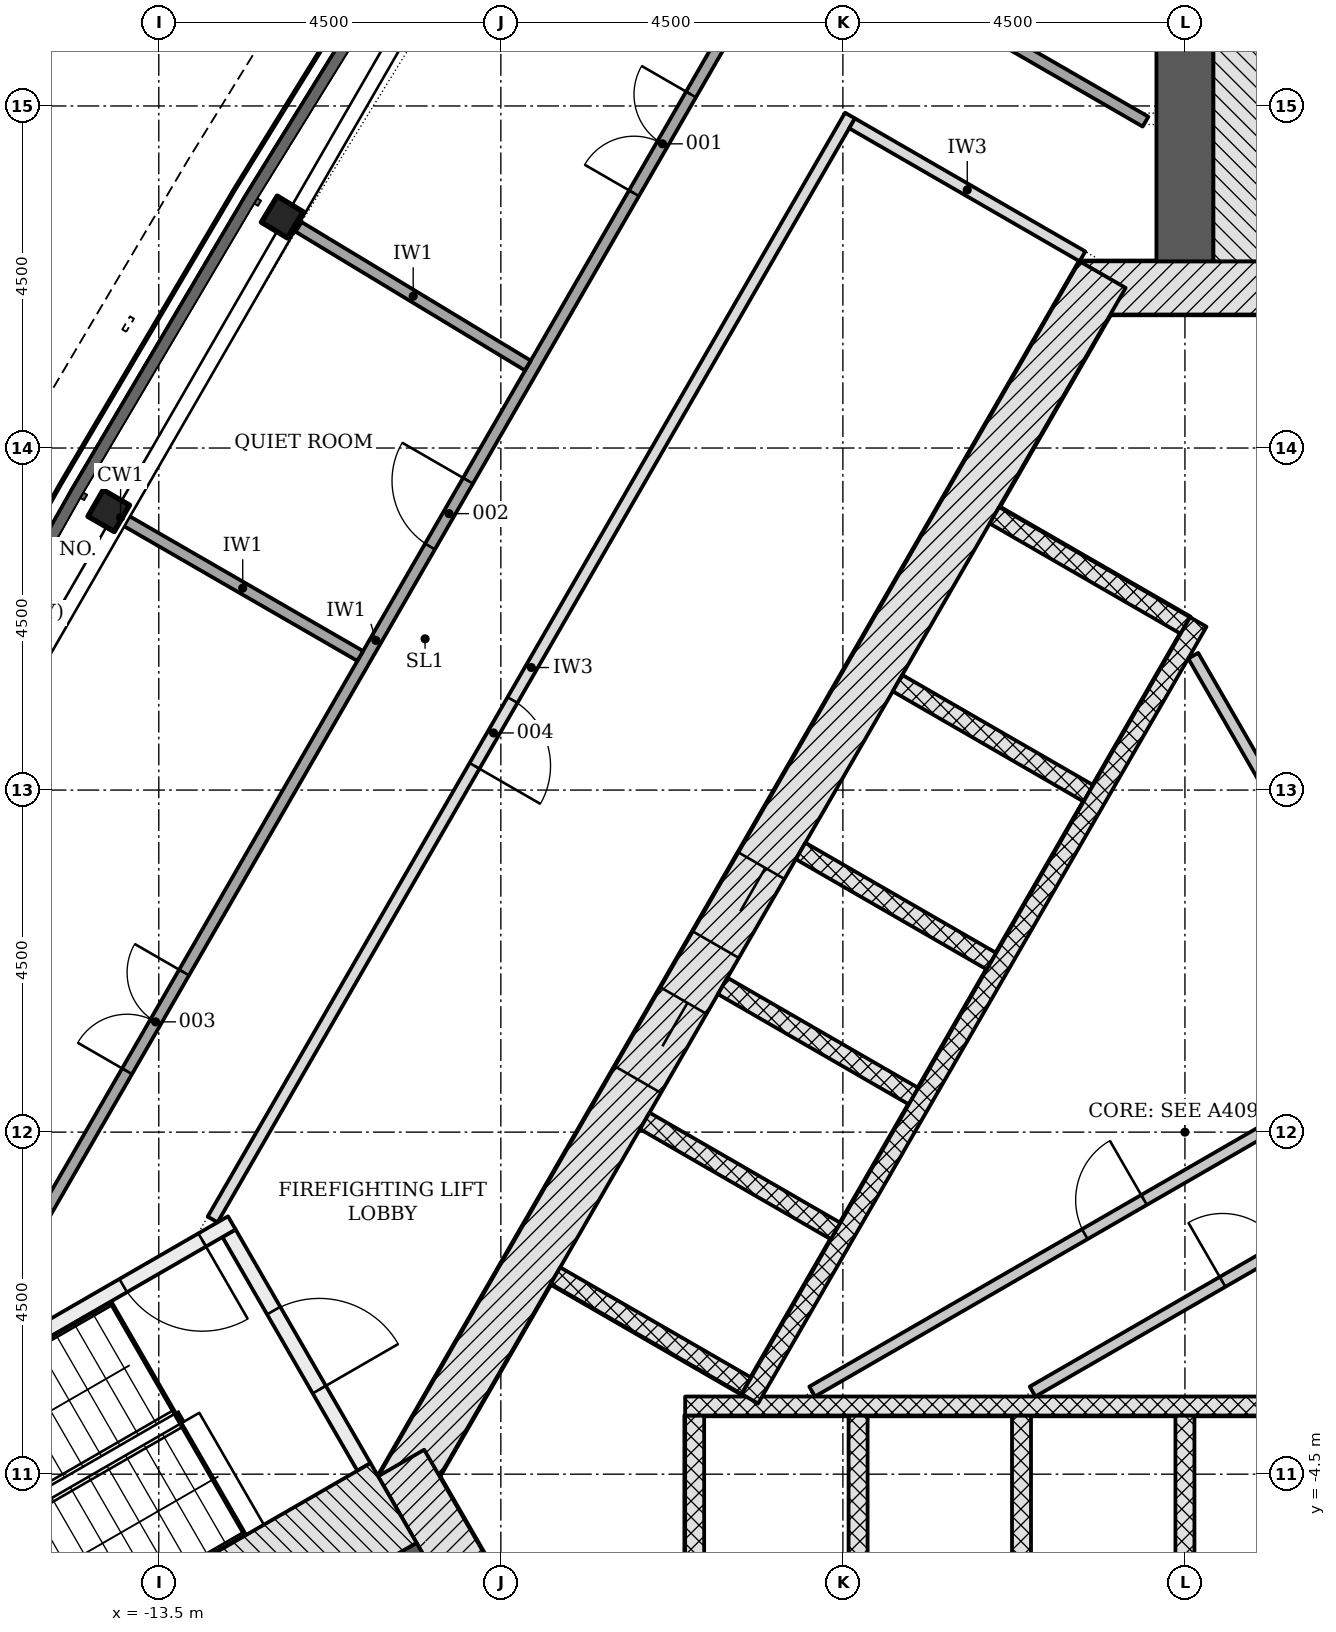
"""IFC4 building model, lengths in metres.
Left out: names, types, materials, properties, quantities, classifications, styles, units other than length and angle.
Written with IfcOpenShell. Run it as: python <this file> out.ifc"""

import sys

from ifc_helpers import new_model, si_unit, direction, frame, frame_2d, origin, origin_2d, place, context, subcontext, project, spatial, rectangle, i_section, extrude, element, fill, save


model = new_model("IFC4")
c1 = context("Model", 3, precision=1e-05, world=origin(), true_north=direction((0.0, 1.0)))
c2 = subcontext(c1, "Body", "Model", "MODEL_VIEW")
j1 = project(units=[si_unit("LENGTHUNIT", "METRE"), si_unit("PLANEANGLEUNIT", "RADIAN")], contexts=[c1])
p1 = place(None, origin())
s1 = spatial("IfcSite", under=j1, at=p1, CompositionType="ELEMENT")
p2 = place(p1, origin())
s2 = spatial("IfcBuilding", under=s1, at=p2, CompositionType="ELEMENT")
p3 = place(p2, frame((0.0, 0.0, 116.7)))
s3 = spatial("IfcBuildingStorey", under=s2, at=p3, CompositionType="ELEMENT", Elevation=116.7)
p4 = place(p3, frame((10.311, -4.703, -0.2), z_axis=(0.0, 0.0, 1.0), x_axis=(-0.500001446645, 0.866024568562, 0.0)))
e1 = element("IfcWall", 1, at=p4, inside=s3, PredefinedType="SHEAR", context=c2, shape_type="SweptSolid", body=[
    extrude(rectangle(XDim=18.458, YDim=0.7, at=frame_2d((9.229, 0.0))), origin(), (0.0, 0.0, 1.0), 3.6),
])
p5 = place(p4, frame((7.5, 0.0, 0.2)))
e2 = element("IfcOpeningElement", 2, at=p5, cuts=e1, PredefinedType="OPENING", context=c2, shape_type="SweptSolid", body=[
    extrude(rectangle(XDim=1.0, YDim=2.1, at=frame_2d((0.5, 1.05))), frame((0.0, 0.36, 0.0), z_axis=(0.0, -1.0, 0.0), x_axis=(1.0, 0.0, 0.0)), (0.0, 0.0, 1.0), 0.72),
])
p6 = place(p4, frame((1.852, 0.0, 0.2)))
e3 = element("IfcOpeningElement", 3, at=p6, cuts=e1, PredefinedType="OPENING", context=c2, shape_type="SweptSolid", body=[
    extrude(rectangle(XDim=0.9, YDim=2.1, at=frame_2d((0.45, 1.05))), frame((0.0, 0.36, 0.0), z_axis=(0.0, -1.0, 0.0), x_axis=(1.0, 0.0, 0.0)), (0.0, 0.0, 1.0), 0.72),
])
p7 = place(p4, frame((5.238, 0.0, 0.2)))
e4 = element("IfcOpeningElement", 4, at=p7, cuts=e1, PredefinedType="OPENING", context=c2, shape_type="SweptSolid", body=[
    extrude(rectangle(XDim=1.0, YDim=2.1, at=frame_2d((0.5, 1.05))), frame((0.0, 0.36, 0.0), z_axis=(0.0, -1.0, 0.0), x_axis=(1.0, 0.0, 0.0)), (0.0, 0.0, 1.0), 0.72),
])
p8 = place(p4, frame((13.63, 0.0, 0.2)))
e5 = element("IfcOpeningElement", 5, at=p8, cuts=e1, PredefinedType="OPENING", context=c2, shape_type="SweptSolid", body=[
    extrude(rectangle(XDim=0.9, YDim=2.1, at=frame_2d((0.45, 1.05))), frame((0.0, 0.36, 0.0), z_axis=(0.0, -1.0, 0.0), x_axis=(1.0, 0.0, 0.0)), (0.0, 0.0, 1.0), 0.72),
])
p9 = place(p3, frame((1.386, 11.106, -0.2), z_axis=(0.0, 0.0, 1.0), x_axis=(-1.0, 0.0, 0.0)))
e6 = element("IfcWall", 6, at=p9, inside=s3, PredefinedType="SHEAR", context=c2, shape_type="SweptSolid", body=[
    extrude(rectangle(XDim=2.771, YDim=0.7, at=frame_2d((1.386, 0.0))), origin(), (0.0, 0.0, 1.0), 3.6),
])
p10 = place(p3, frame((-1.083, 11.281, -0.2), z_axis=(0.0, 0.0, 1.0), x_axis=(-0.500001446645, -0.866024568562, 0.0)))
e7 = element("IfcWall", 7, at=p10, inside=s3, PredefinedType="SHEAR", context=c2, shape_type="SweptSolid", body=[
    extrude(rectangle(XDim=18.458, YDim=0.7, at=frame_2d((9.229, 0.0))), origin(), (0.0, 0.0, 1.0), 3.6),
])
p11 = place(p10, frame((8.979, 0.0, 0.2)))
e8 = element("IfcOpeningElement", 8, at=p11, cuts=e7, PredefinedType="OPENING", context=c2, shape_type="SweptSolid", body=[
    extrude(rectangle(XDim=1.2, YDim=2.1, at=frame_2d((0.6, 1.05))), frame((0.0, 0.36, 0.0), z_axis=(0.0, -1.0, 0.0), x_axis=(1.0, 0.0, 0.0)), (0.0, 0.0, 1.0), 0.72),
])
p12 = place(p10, frame((11.029, 0.0, 0.2)))
e9 = element("IfcOpeningElement", 9, at=p12, cuts=e7, PredefinedType="OPENING", context=c2, shape_type="SweptSolid", body=[
    extrude(rectangle(XDim=1.2, YDim=2.1, at=frame_2d((0.6, 1.05))), frame((0.0, 0.36, 0.0), z_axis=(0.0, -1.0, 0.0), x_axis=(1.0, 0.0, 0.0)), (0.0, 0.0, 1.0), 0.72),
])
p13 = place(p3, frame((-10.311, -4.353, -0.2), z_axis=(0.0, 0.0, 1.0), x_axis=(0.500042739161, -0.866000726912, 0.0)))
e10 = element("IfcWall", 10, at=p13, inside=s3, PredefinedType="SHEAR", context=c2, shape_type="SweptSolid", body=[
    extrude(rectangle(XDim=2.771, YDim=0.7, at=frame_2d((1.386, 0.0))), origin(), (0.0, 0.0, 1.0), 3.6),
])
p14 = place(p3, frame((0.0, 11.456, -0.2), z_axis=(0.0, 0.0, 1.0), x_axis=(0.0, 1.0, 0.0)))
e11 = element("IfcWall", 11, at=p14, inside=s3, PredefinedType="SHEAR", context=c2, shape_type="SweptSolid", body=[
    extrude(rectangle(XDim=11.539, YDim=0.75, at=frame_2d((5.77, 0.0))), origin(), (0.0, 0.0, 1.0), 3.6),
])
p15 = place(p3, frame((-9.922, -5.728, -0.2), z_axis=(0.0, 0.0, 1.0), x_axis=(-0.866024913782, -0.500000848707, 0.0)))
e12 = element("IfcWall", 12, at=p15, inside=s3, PredefinedType="SHEAR", context=c2, shape_type="SweptSolid", body=[
    extrude(rectangle(XDim=11.539, YDim=0.75, at=frame_2d((5.769, 0.0))), origin(), (0.0, 0.0, 1.0), 3.6),
])
for number, where, z_axis, x_axis in (
    (13, (-11.875, 12.039, -0.2), (0.0, 0.0, 1.0), (-0.517, -0.856, 0.0)),
    (14, (-14.159, 8.175, -0.2), (0.0, 0.0, 1.0), (-0.5, -0.866, 0.0)),
):
    element("IfcColumn", number, at=place(p3, frame(where, z_axis=z_axis, x_axis=x_axis)), inside=s3, PredefinedType="COLUMN", context=c2, shape_type="SweptSolid", body=[
        extrude(i_section(OverallWidth=0.401, OverallDepth=0.399, WebThickness=0.025, FlangeThickness=0.04, FilletRadius=0.015, at=origin_2d()), origin(), (0.0, 0.0, 1.0), 3.6),
    ])
for number, where, z_axis, x_axis in (
    (15, (-6.45, -6.228, -0.2), (0.0, 0.0, 1.0), (0.0, 1.0, 0.0)),
    (16, (-4.3, -6.228, -0.2), (0.0, 0.0, 1.0), (0.0, 1.0, 0.0)),
    (17, (-2.15, -6.228, -0.2), (0.0, 0.0, 1.0), (0.0, 1.0, 0.0)),
    (18, (0.0, -6.228, -0.2), (0.0, 0.0, 1.0), (0.0, 1.0, 0.0)),
):
    element("IfcWall", number, at=place(p3, frame(where, z_axis=z_axis, x_axis=x_axis)), inside=s3, PredefinedType="PARTITIONING", context=c2, shape_type="SweptSolid", body=[
        extrude(rectangle(XDim=2.5, YDim=0.25, at=frame_2d((1.25, 0.0))), origin(), (0.0, 0.0, 1.0), 3.6),
    ])
p16 = place(p3, frame((-6.575, -3.603, 0.0), z_axis=(0.0, 0.0, 1.0), x_axis=(1.0, 0.0, 0.0)))
e19 = element("IfcWall", 19, at=p16, inside=s3, PredefinedType="PARTITIONING", context=c2, shape_type="SweptSolid", body=[
    extrude(rectangle(XDim=13.15, YDim=0.25, at=frame_2d((6.575, 0.0))), origin(), (0.0, 0.0, 1.0), 3.4),
])
p17 = place(p3, frame((-2.506, 8.115, -0.2), z_axis=(0.0, 0.0, 1.0), x_axis=(0.865996321171, -0.50005036918, 0.0)))
e20 = element("IfcWall", 20, at=p17, inside=s3, PredefinedType="PARTITIONING", context=c2, shape_type="SweptSolid", body=[
    extrude(rectangle(XDim=2.9, YDim=0.25, at=frame_2d((1.45, 0.0))), origin(), (0.0, 0.0, 1.0), 3.6),
])
for number, where, z_axis, x_axis in (
    (21, (-3.781, 5.907, -0.2), (0.0, 0.0, 1.0), (0.866, -0.5, 0.0)),
    (22, (-5.056, 3.699, -0.2), (0.0, 0.0, 1.0), (0.866, -0.5, 0.0)),
    (23, (-6.081, 1.923, -0.2), (0.0, 0.0, 1.0), (0.866, -0.5, 0.0)),
    (24, (-7.106, 0.148, -0.2), (0.0, 0.0, 1.0), (0.866, -0.5, 0.0)),
    (25, (-8.281, -1.887, -0.2), (0.0, 0.0, 1.0), (0.866, -0.5, 0.0)),
):
    element("IfcWall", number, at=place(p3, frame(where, z_axis=z_axis, x_axis=x_axis)), inside=s3, PredefinedType="PARTITIONING", context=c2, shape_type="SweptSolid", body=[
        extrude(rectangle(XDim=2.9, YDim=0.25, at=frame_2d((1.45, 0.0))), origin(), (0.0, 0.0, 1.0), 3.6),
    ])
p18 = place(p3, frame((0.176, 6.711, 0.0), z_axis=(0.0, 0.0, 1.0), x_axis=(-0.500004227369, -0.866022963098, 0.0)))
e26 = element("IfcWall", 26, at=p18, inside=s3, PredefinedType="PARTITIONING", context=c2, shape_type="SweptSolid", body=[
    extrude(rectangle(XDim=11.8, YDim=0.25, at=frame_2d((5.9, 0.0))), origin(), (0.0, 0.0, 1.0), 3.4),
])
p19 = place(p3, frame((-4.904, -3.413, 0.0), z_axis=(0.0, 0.0, 1.0), x_axis=(0.866020716117, 0.500008119189, 0.0)))
e27 = element("IfcWall", 27, at=p19, inside=s3, PredefinedType="PARTITIONING", context=c2, shape_type="SweptSolid", body=[
    extrude(rectangle(XDim=12.182, YDim=0.15, at=frame_2d((6.091, 0.0))), origin(), (0.0, 0.0, 1.0), 3.4),
])
p20 = place(p19, frame((4.142, 0.0, 0.0)))
e28 = element("IfcOpeningElement", 28, at=p20, cuts=e27, PredefinedType="OPENING", context=c2, shape_type="SweptSolid", body=[
    extrude(rectangle(XDim=0.9, YDim=2.1, at=frame_2d((0.45, 1.05))), frame((0.0, 0.085, 0.0), z_axis=(0.0, -1.0, 0.0), x_axis=(1.0, 0.0, 0.0)), (0.0, 0.0, 1.0), 0.17),
])
p21 = place(p3, frame((-2.004, -3.413, 0.0), z_axis=(0.0, 0.0, 1.0), x_axis=(0.866030034802, 0.499991978756, 0.0)))
e29 = element("IfcWall", 29, at=p21, inside=s3, PredefinedType="PARTITIONING", context=c2, shape_type="SweptSolid", body=[
    extrude(rectangle(XDim=9.671, YDim=0.15, at=frame_2d((4.835, 0.0))), origin(), (0.0, 0.0, 1.0), 3.4),
])
p22 = place(p21, frame((2.886, 0.0, 0.0)))
e30 = element("IfcOpeningElement", 30, at=p22, cuts=e29, PredefinedType="OPENING", context=c2, shape_type="SweptSolid", body=[
    extrude(rectangle(XDim=0.9, YDim=2.1, at=frame_2d((0.45, 1.05))), frame((0.0, 0.085, 0.0), z_axis=(0.0, -1.0, 0.0), x_axis=(1.0, 0.0, 0.0)), (0.0, 0.0, 1.0), 0.17),
])
p23 = place(p3, frame((2.86, 1.503, 0.0), z_axis=(0.0, 0.0, 1.0), x_axis=(-0.500014382217, 0.866017100048, 0.0)))
e31 = element("IfcWall", 31, at=p23, inside=s3, PredefinedType="PARTITIONING", context=c2, shape_type="SweptSolid", body=[
    extrude(rectangle(XDim=5.502, YDim=0.15, at=frame_2d((2.751, 0.0))), origin(), (0.0, 0.0, 1.0), 3.4),
])
p24 = place(p3, frame((0.98, 11.456, -0.2), z_axis=(0.0, 0.0, 1.0), x_axis=(0.0, 1.0, 0.0)))
e32 = element("IfcWall", 32, at=p24, inside=s3, PredefinedType="SHEAR", context=c2, shape_type="SweptSolid", body=[
    extrude(rectangle(XDim=7.2, YDim=1.211, at=frame_2d((3.6, 0.0))), origin(), (0.0, 0.0, 1.0), 3.6),
])
p25 = place(p3, frame((-12.576, -1.331, -0.2), z_axis=(0.0, 0.0, 1.0), x_axis=(0.499970499736, -0.8660424351, 0.0)))
e33 = element("IfcWall", 33, at=p25, inside=s3, PredefinedType="SHEAR", context=c2, shape_type="SweptSolid", body=[
    extrude(rectangle(XDim=3.55, YDim=0.2, at=frame_2d((1.775, 0.0))), origin(), (0.0, 0.0, 1.0), 3.6),
])
p26 = place(p25, frame((1.175, 0.0, 0.2)))
e34 = element("IfcOpeningElement", 34, at=p26, cuts=e33, PredefinedType="OPENING", context=c2, shape_type="SweptSolid", body=[
    extrude(rectangle(XDim=1.2, YDim=2.1, at=frame_2d((0.6, 1.05))), frame((0.0, 0.11, 0.0), z_axis=(0.0, -1.0, 0.0), x_axis=(1.0, 0.0, 0.0)), (0.0, 0.0, 1.0), 0.22),
])
p27 = place(p3, frame((-12.539, -1.194, -0.2), z_axis=(0.0, 0.0, 1.0), x_axis=(-0.866045472092, -0.499965239061, 0.0)))
e35 = element("IfcWall", 35, at=p27, inside=s3, PredefinedType="SHEAR", context=c2, shape_type="SweptSolid", body=[
    extrude(rectangle(XDim=5.6, YDim=0.2, at=frame_2d((2.8, 0.0))), origin(), (0.0, 0.0, 1.0), 3.6),
])
p28 = place(p27, frame((0.45, 0.0, 0.2)))
e36 = element("IfcOpeningElement", 36, at=p28, cuts=e35, PredefinedType="OPENING", context=c2, shape_type="SweptSolid", body=[
    extrude(rectangle(XDim=1.2, YDim=2.1, at=frame_2d((0.6, 1.05))), frame((0.0, 0.11, 0.0), z_axis=(0.0, -1.0, 0.0), x_axis=(1.0, 0.0, 0.0)), (0.0, 0.0, 1.0), 0.22),
])
p29 = place(p3, frame((-10.412, -4.879, -0.2), z_axis=(0.0, 0.0, 1.0), x_axis=(-0.866026919366, -0.499997374926, 0.0)))
e37 = element("IfcWall", 37, at=p29, inside=s3, PredefinedType="SHEAR", context=c2, shape_type="SweptSolid", body=[
    extrude(rectangle(XDim=7.2, YDim=1.211, at=frame_2d((3.6, 0.0))), origin(), (0.0, 0.0, 1.0), 3.6),
])
p30 = place(p3, frame((-16.169, -3.099, 0.0), z_axis=(0.0, 0.0, 1.0), x_axis=(0.499999805269, 0.866025516212, 0.0)))
e38 = element("IfcWall", 38, at=p30, inside=s3, PredefinedType="PARTITIONING", context=c2, shape_type="SweptSolid", body=[
    extrude(rectangle(XDim=22.097, YDim=0.15, at=frame_2d((11.049, 0.0))), origin(), (0.0, 0.0, 1.0), 2.847),
])
p31 = place(p30, frame((17.842, 0.0, 0.0)))
e39 = element("IfcOpeningElement", 39, at=p31, cuts=e38, PredefinedType="OPENING", context=c2, shape_type="SweptSolid", body=[
    extrude(rectangle(XDim=1.5, YDim=2.1, at=frame_2d((0.75, 1.05))), frame((0.0, 0.085, 0.0), z_axis=(0.0, -1.0, 0.0), x_axis=(1.0, 0.0, 0.0)), (0.0, 0.0, 1.0), 0.17),
])
p32 = place(p30, frame((12.474, 0.0, 0.0)))
e40 = element("IfcOpeningElement", 40, at=p32, cuts=e38, PredefinedType="OPENING", context=c2, shape_type="SweptSolid", body=[
    extrude(rectangle(XDim=1.0, YDim=2.1, at=frame_2d((0.5, 1.05))), frame((0.0, 0.085, 0.0), z_axis=(0.0, -1.0, 0.0), x_axis=(1.0, 0.0, 0.0)), (0.0, 0.0, 1.0), 0.17),
])
p33 = place(p30, frame((4.503, 0.0, 0.0)))
e41 = element("IfcOpeningElement", 41, at=p33, cuts=e38, PredefinedType="OPENING", context=c2, shape_type="SweptSolid", body=[
    extrude(rectangle(XDim=1.5, YDim=2.1, at=frame_2d((0.75, 1.05))), frame((0.0, 0.085, 0.0), z_axis=(0.0, -1.0, 0.0), x_axis=(1.0, 0.0, 0.0)), (0.0, 0.0, 1.0), 0.17),
])
p34 = place(p3, frame((-4.407, 13.374, 0.0), z_axis=(0.0, 0.0, 1.0), x_axis=(-0.499997181693, -0.866027030928, 0.0)))
e42 = element("IfcWall", 42, at=p34, inside=s3, PredefinedType="PARTITIONING", context=c2, shape_type="SweptSolid", body=[
    extrude(rectangle(XDim=16.77, YDim=0.15, at=frame_2d((8.385, 0.0))), origin(), (0.0, 0.0, 1.0), 2.847),
])
p35 = place(p34, frame((8.879, 0.0, 0.0)))
e43 = element("IfcOpeningElement", 43, at=p35, cuts=e42, PredefinedType="OPENING", context=c2, shape_type="SweptSolid", body=[
    extrude(rectangle(XDim=1.0, YDim=2.1, at=frame_2d((0.5, 1.05))), frame((0.0, 0.085, 0.0), z_axis=(0.0, -1.0, 0.0), x_axis=(1.0, 0.0, 0.0)), (0.0, 0.0, 1.0), 0.17),
])
p36 = place(p3, frame((-5.093, 15.935, 0.0), z_axis=(0.0, 0.0, 1.0), x_axis=(0.866033195618, -0.499986503906, 0.0)))
e44 = element("IfcWall", 44, at=p36, inside=s3, PredefinedType="PARTITIONING", context=c2, shape_type="SweptSolid", body=[
    extrude(rectangle(XDim=5.282, YDim=0.15, at=frame_2d((2.641, 0.0))), origin(), (0.0, 0.0, 1.0), 3.4),
])
p37 = place(p3, frame((-4.379, 13.271, 0.0), z_axis=(0.0, 0.0, 1.0), x_axis=(0.866019471182, -0.500010275428, 0.0)))
e45 = element("IfcWall", 45, at=p37, inside=s3, PredefinedType="PARTITIONING", context=c2, shape_type="SweptSolid", body=[
    extrude(rectangle(XDim=3.5, YDim=0.15, at=frame_2d((1.75, 0.0))), origin(), (0.0, 0.0, 1.0), 3.4),
])
p38 = place(p3, frame((-13.942, 8.05, 0.0), z_axis=(0.0, 0.0, 1.0), x_axis=(0.866034162518, -0.499984829122, 0.0)))
e46 = element("IfcWall", 46, at=p38, inside=s3, PredefinedType="PARTITIONING", context=c2, shape_type="SweptSolid", body=[
    extrude(rectangle(XDim=3.571, YDim=0.15, at=frame_2d((1.785, 0.0))), origin(), (0.0, 0.0, 1.0), 2.847),
])
p39 = place(p3, frame((-11.661, 11.91, 0.0), z_axis=(0.0, 0.0, 1.0), x_axis=(0.855697033778, -0.517477136098, 0.0)))
e47 = element("IfcWall", 47, at=p39, inside=s3, PredefinedType="PARTITIONING", context=c2, shape_type="SweptSolid", body=[
    extrude(rectangle(XDim=3.525, YDim=0.15, at=frame_2d((1.762, 0.0))), origin(), (0.0, 0.0, 1.0), 2.847),
])
p40 = place(p11, origin())
e48 = element("IfcDoor", 48, at=p40, inside=s3, OperationType="DOUBLE_DOOR_SLIDING", PredefinedType="DOOR", context=c2, shape_type="SweptSolid", body=[
    extrude(rectangle(XDim=1.2, YDim=2.1, at=frame_2d((0.6, 1.05))), frame((0.0, 0.025, 0.0), z_axis=(0.0, -1.0, 0.0), x_axis=(1.0, 0.0, 0.0)), (0.0, 0.0, 1.0), 0.05),
])
fill(e8, e48)
p41 = place(p12, origin())
e49 = element("IfcDoor", 49, at=p41, inside=s3, OperationType="DOUBLE_DOOR_SLIDING", PredefinedType="DOOR", context=c2, shape_type="SweptSolid", body=[
    extrude(rectangle(XDim=1.2, YDim=2.1, at=frame_2d((0.6, 1.05))), frame((0.0, 0.025, 0.0), z_axis=(0.0, -1.0, 0.0), x_axis=(1.0, 0.0, 0.0)), (0.0, 0.0, 1.0), 0.05),
])
fill(e9, e49)
p42 = place(p22, origin())
e50 = element("IfcDoor", 50, at=p42, inside=s3, OperationType="SINGLE_SWING_LEFT", PredefinedType="DOOR", context=c2, shape_type="SweptSolid", body=[
    extrude(rectangle(XDim=0.9, YDim=2.1, at=frame_2d((0.45, 1.05))), frame((0.0, 0.025, 0.0), z_axis=(0.0, -1.0, 0.0), x_axis=(1.0, 0.0, 0.0)), (0.0, 0.0, 1.0), 0.05),
])
fill(e30, e50)
p43 = place(p20, origin())
e51 = element("IfcDoor", 51, at=p43, inside=s3, OperationType="SINGLE_SWING_RIGHT", PredefinedType="DOOR", context=c2, shape_type="SweptSolid", body=[
    extrude(rectangle(XDim=0.9, YDim=2.1, at=frame_2d((0.45, 1.05))), frame((0.0, 0.025, 0.0), z_axis=(0.0, -1.0, 0.0), x_axis=(1.0, 0.0, 0.0)), (0.0, 0.0, 1.0), 0.05),
])
fill(e28, e51)
p44 = place(p26, origin())
e52 = element("IfcDoor", 52, at=p44, inside=s3, OperationType="SINGLE_SWING_RIGHT", PredefinedType="DOOR", context=c2, shape_type="SweptSolid", body=[
    extrude(rectangle(XDim=1.2, YDim=2.1, at=frame_2d((0.6, 1.05))), frame((0.0, 0.025, 0.0), z_axis=(0.0, -1.0, 0.0), x_axis=(1.0, 0.0, 0.0)), (0.0, 0.0, 1.0), 0.05),
])
fill(e34, e52)
p45 = place(p28, origin())
e53 = element("IfcDoor", 53, at=p45, inside=s3, OperationType="SINGLE_SWING_LEFT", PredefinedType="DOOR", context=c2, shape_type="SweptSolid", body=[
    extrude(rectangle(XDim=1.2, YDim=2.1, at=frame_2d((0.6, 1.05))), frame((0.0, 0.025, 0.0), z_axis=(0.0, -1.0, 0.0), x_axis=(1.0, 0.0, 0.0)), (0.0, 0.0, 1.0), 0.05),
])
fill(e36, e53)
p46 = place(p31, origin())
e54 = element("IfcDoor", 54, at=p46, inside=s3, OperationType="DOUBLE_DOOR_SINGLE_SWING", PredefinedType="DOOR", context=c2, shape_type="SweptSolid", body=[
    extrude(rectangle(XDim=1.5, YDim=2.1, at=frame_2d((0.75, 1.05))), frame((0.0, 0.025, 0.0), z_axis=(0.0, -1.0, 0.0), x_axis=(1.0, 0.0, 0.0)), (0.0, 0.0, 1.0), 0.05),
])
fill(e39, e54)
p47 = place(p32, origin())
e55 = element("IfcDoor", 55, at=p47, inside=s3, OperationType="SINGLE_SWING_RIGHT", PredefinedType="DOOR", context=c2, shape_type="SweptSolid", body=[
    extrude(rectangle(XDim=1.0, YDim=2.1, at=frame_2d((0.5, 1.05))), frame((0.0, 0.025, 0.0), z_axis=(0.0, -1.0, 0.0), x_axis=(1.0, 0.0, 0.0)), (0.0, 0.0, 1.0), 0.05),
])
fill(e40, e55)
p48 = place(p33, origin())
e56 = element("IfcDoor", 56, at=p48, inside=s3, OperationType="DOUBLE_DOOR_SINGLE_SWING", PredefinedType="DOOR", context=c2, shape_type="SweptSolid", body=[
    extrude(rectangle(XDim=1.5, YDim=2.1, at=frame_2d((0.75, 1.05))), frame((0.0, 0.025, 0.0), z_axis=(0.0, -1.0, 0.0), x_axis=(1.0, 0.0, 0.0)), (0.0, 0.0, 1.0), 0.05),
])
fill(e41, e56)
p49 = place(p35, origin())
e57 = element("IfcDoor", 57, at=p49, inside=s3, OperationType="SINGLE_SWING_RIGHT", PredefinedType="DOOR", context=c2, shape_type="SweptSolid", body=[
    extrude(rectangle(XDim=1.0, YDim=2.1, at=frame_2d((0.5, 1.05))), frame((0.0, 0.025, 0.0), z_axis=(0.0, -1.0, 0.0), x_axis=(1.0, 0.0, 0.0)), (0.0, 0.0, 1.0), 0.05),
])
fill(e43, e57)
save(model, sys.argv[1])
